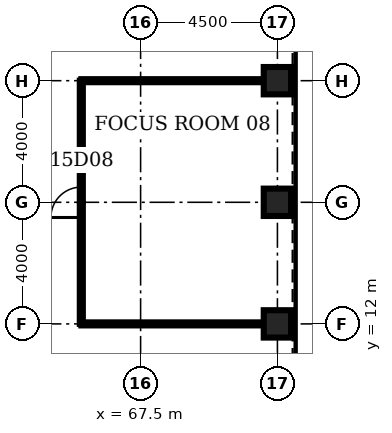
"""IFC4 building model, lengths in metres.
Left out: names, types, materials, properties, quantities, classifications, styles, units other than length and angle.
Written with IfcOpenShell. Run it as: python <this file> out.ifc"""

import sys

from ifc_helpers import new_model, si_unit, direction, frame, frame_2d, origin, origin_2d, place, context, subcontext, project, spatial, rectangle, hollow_rectangle, extrude, element, fill, save


model = new_model("IFC4")
c1 = context("Model", 3, precision=1e-05, world=origin(), true_north=direction((0.0, 1.0)))
c2 = subcontext(c1, "Body", "Model", "MODEL_VIEW")
j1 = project(units=[si_unit("LENGTHUNIT", "METRE"), si_unit("PLANEANGLEUNIT", "RADIAN")], contexts=[c1])
p1 = place(None, origin())
s1 = spatial("IfcSite", under=j1, at=p1, CompositionType="ELEMENT")
p2 = place(p1, origin())
s2 = spatial("IfcBuilding", under=s1, at=p2, CompositionType="ELEMENT")
p3 = place(p2, frame((0.0, 0.0, 72.5)))
s3 = spatial("IfcBuildingStorey", under=s2, at=p3, CompositionType="ELEMENT", Elevation=72.5)
for number, where, z_axis, x_axis in (
    (1, (72.0, 12.0, 0.0), (0.0, 0.0, 1.0), (1.0, 0.0, 0.0)),
    (2, (72.0, 16.0, 0.0), (0.0, 0.0, 1.0), (1.0, 0.0, 0.0)),
    (3, (72.0, 20.0, 0.0), (0.0, 0.0, 1.0), (1.0, 0.0, 0.0)),
):
    element("IfcColumn", number, at=place(p3, frame(where, z_axis=z_axis, x_axis=x_axis)), inside=s3, PredefinedType="COLUMN", context=c2, shape_type="SweptSolid", body=[
        extrude(hollow_rectangle(XDim=0.9, YDim=0.9, WallThickness=0.12, at=origin_2d()), origin(), (0.0, 0.0, 1.0), 4.5),
    ])
for number, where, z_axis, x_axis in (
    (4, (65.55, 12.0, 0.0), (0.0, 0.0, 1.0), (1.0, 0.0, 0.0)),
    (5, (65.55, 20.0, 0.0), (0.0, 0.0, 1.0), (1.0, 0.0, 0.0)),
):
    element("IfcWall", number, at=place(p3, frame(where, z_axis=z_axis, x_axis=x_axis)), inside=s3, PredefinedType="PARTITIONING", context=c2, shape_type="SweptSolid", body=[
        extrude(rectangle(XDim=6.0, YDim=0.1, at=frame_2d((3.0, 0.0))), origin(), (0.0, 0.0, 1.0), 3.0),
    ])
p4 = place(p3, frame((65.55, 12.0, 0.0), z_axis=(0.0, 0.0, 1.0), x_axis=(0.0, 1.0, 0.0)))
e6 = element("IfcWall", 6, at=p4, inside=s3, PredefinedType="PARTITIONING", context=c2, shape_type="SweptSolid", body=[
    extrude(rectangle(XDim=8.0, YDim=0.1, at=frame_2d((4.0, 0.0))), origin(), (0.0, 0.0, 1.0), 3.0),
])
p5 = place(p4, frame((3.5, 0.0, 0.0)))
e7 = element("IfcOpeningElement", 7, at=p5, cuts=e6, PredefinedType="OPENING", context=c2, shape_type="SweptSolid", body=[
    extrude(rectangle(XDim=1.0, YDim=2.1, at=frame_2d((0.5, 1.05))), frame((0.0, 0.06, 0.0), z_axis=(0.0, -1.0, 0.0), x_axis=(1.0, 0.0, 0.0)), (0.0, 0.0, 1.0), 0.12),
])
p6 = place(p5, origin())
e8 = element("IfcDoor", 8, at=p6, inside=s3, OperationType="SINGLE_SWING_LEFT", PredefinedType="DOOR", context=c2, shape_type="SweptSolid", body=[
    extrude(rectangle(XDim=1.0, YDim=2.1, at=frame_2d((0.5, 1.05))), frame((0.0, 0.025, 0.0), z_axis=(0.0, -1.0, 0.0), x_axis=(1.0, 0.0, 0.0)), (0.0, 0.0, 1.0), 0.05),
])
fill(e7, e8)
save(model, sys.argv[1])
